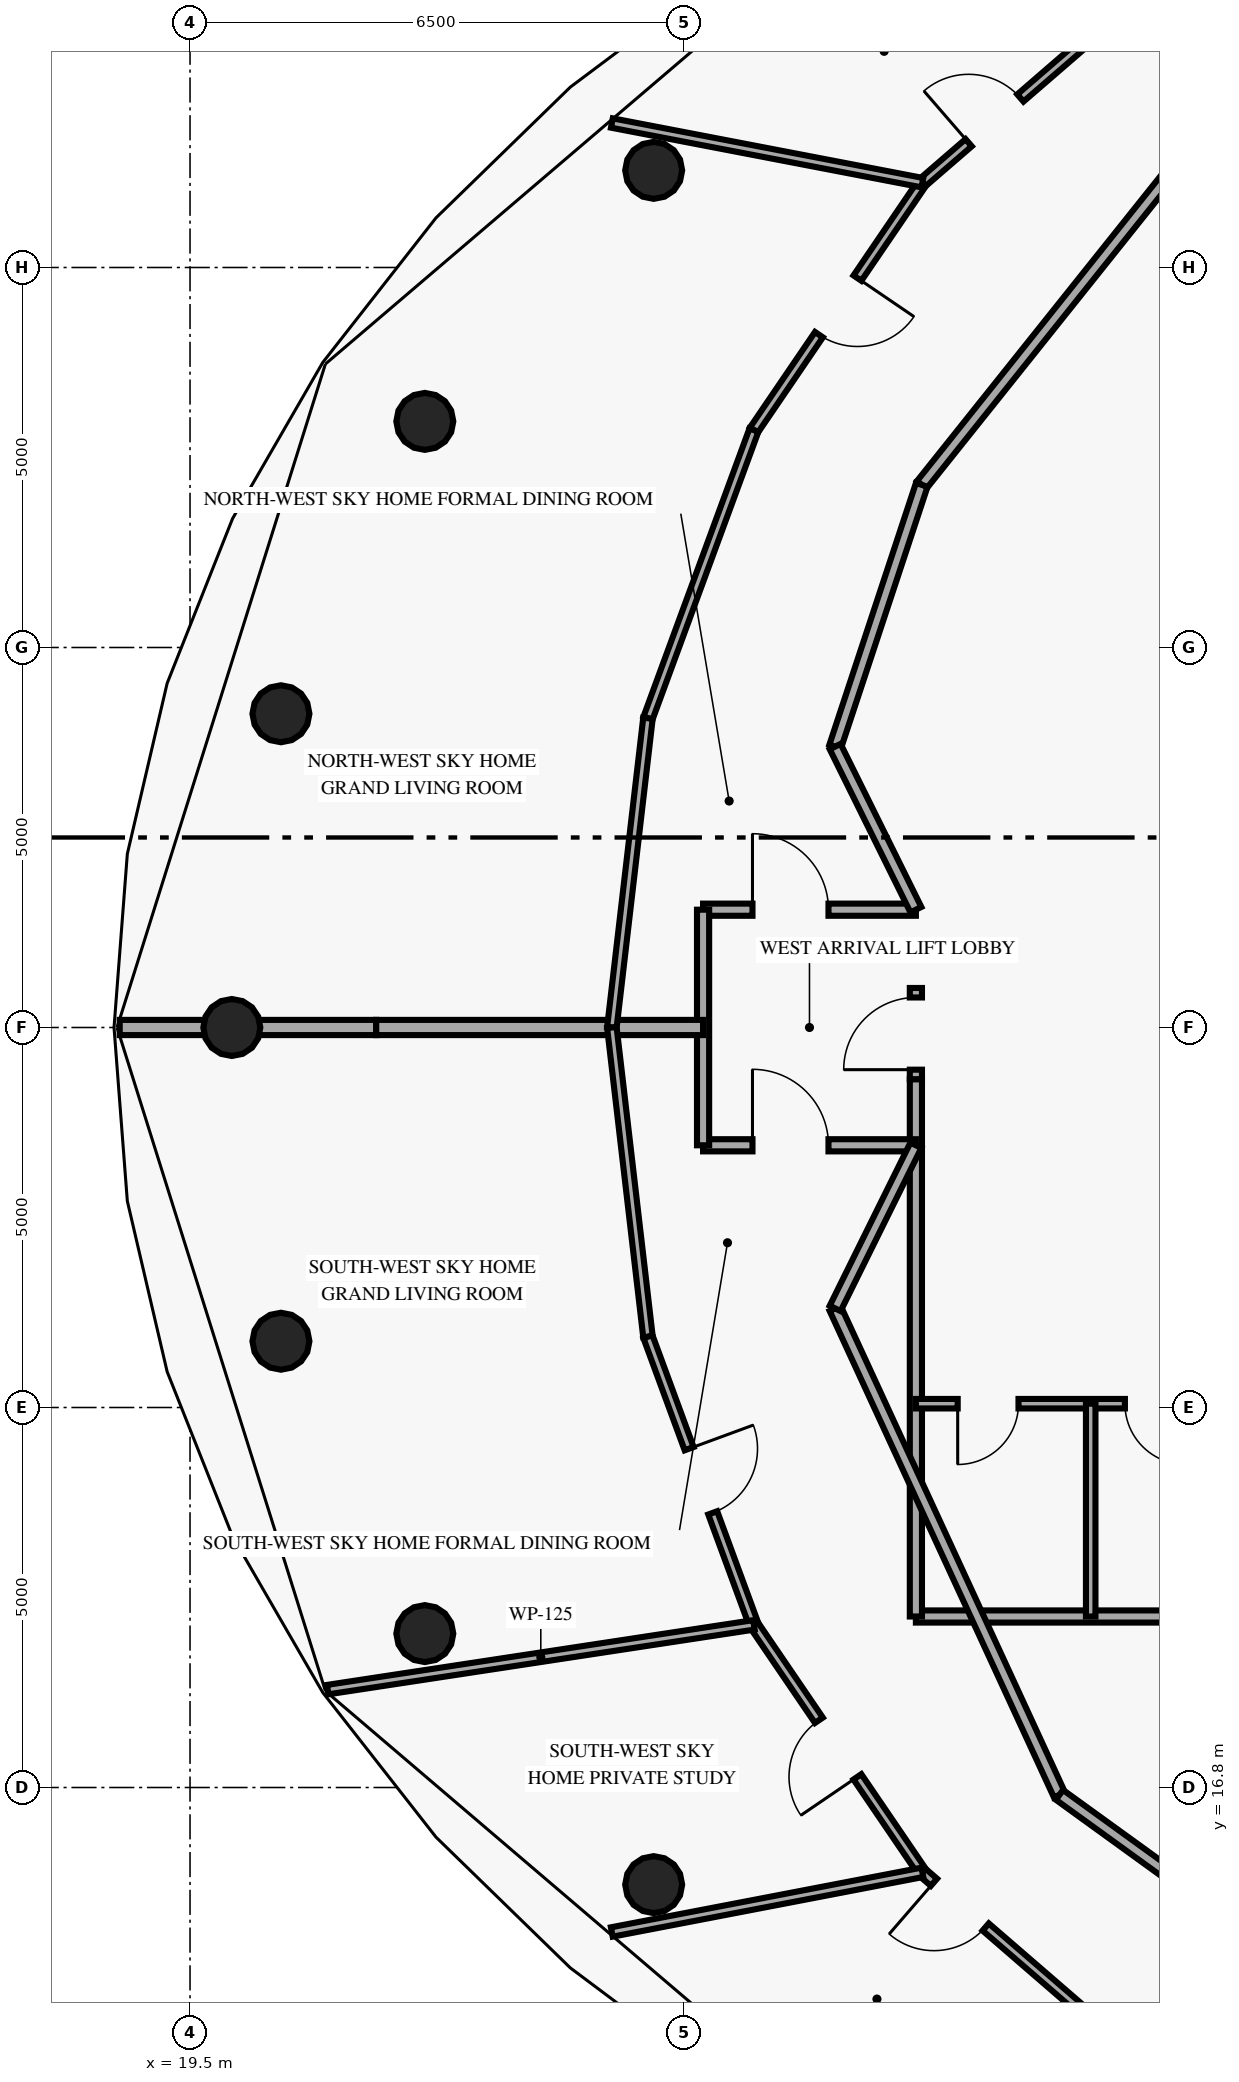
"""IFC4 building model, lengths in metres.
Left out: names, types, materials, properties, quantities, classifications, styles, units other than length and angle.
Written with IfcOpenShell. Run it as: python <this file> out.ifc"""

import sys

from ifc_helpers import new_model, si_unit, direction, frame, frame_2d, origin, origin_2d, place, context, subcontext, project, spatial, rectangle, circle, extrude, element, fill, save


model = new_model("IFC4")
c1 = context("Model", 3, precision=1e-05, world=origin(), true_north=direction((0.0, 1.0)))
c2 = subcontext(c1, "Body", "Model", "MODEL_VIEW")
j1 = project(units=[si_unit("LENGTHUNIT", "METRE"), si_unit("PLANEANGLEUNIT", "RADIAN")], contexts=[c1])
p1 = place(None, origin())
s1 = spatial("IfcSite", under=j1, at=p1, CompositionType="ELEMENT")
p2 = place(p1, origin())
s2 = spatial("IfcBuilding", under=s1, at=p2, CompositionType="ELEMENT")
p3 = place(p2, frame((0.0, 0.0, 297.4)))
s3 = spatial("IfcBuildingStorey", under=s2, at=p3, CompositionType="ELEMENT", Elevation=297.4)
for number, where, z_axis, x_axis in (
    (1, (25.6, 38.078, 0.0), (0.0, 0.0, 1.0), (1.0, 0.0, 0.0)),
    (2, (22.589, 34.775, 0.0), (0.0, 0.0, 1.0), (1.0, 0.0, 0.0)),
    (3, (20.696, 30.928, 0.0), (0.0, 0.0, 1.0), (1.0, 0.0, 0.0)),
    (4, (20.05, 26.8, 0.0), (0.0, 0.0, 1.0), (1.0, 0.0, 0.0)),
    (5, (20.696, 22.672, 0.0), (0.0, 0.0, 1.0), (1.0, 0.0, 0.0)),
    (6, (22.589, 18.825, 0.0), (0.0, 0.0, 1.0), (1.0, 0.0, 0.0)),
    (7, (25.6, 15.522, 0.0), (0.0, 0.0, 1.0), (1.0, 0.0, 0.0)),
):
    element("IfcColumn", number, at=place(p3, frame(where, z_axis=z_axis, x_axis=x_axis)), inside=s3, PredefinedType="COLUMN", context=c2, shape_type="SweptSolid", body=[
        extrude(circle(Radius=0.375, at=origin_2d()), origin(), (0.0, 0.0, 1.0), 3.45),
    ])
p4 = place(p3, frame((29.05, 19.05, 0.0), z_axis=(0.0, 0.0, 1.0), x_axis=(1.0, 0.0, 0.0)))
e8 = element("IfcWall", 8, at=p4, inside=s3, PredefinedType="PARTITIONING", context=c2, shape_type="SweptSolid", body=[
    extrude(rectangle(XDim=4.65, YDim=0.16, at=frame_2d((2.325, 0.0))), origin(), (0.0, 0.0, 1.0), 3.45),
])
p5 = place(p3, frame((29.05, 19.05, 0.0), z_axis=(0.0, 0.0, 1.0), x_axis=(0.0, 1.0, 0.0)))
e9 = element("IfcWall", 9, at=p5, inside=s3, PredefinedType="PARTITIONING", context=c2, shape_type="SweptSolid", body=[
    extrude(rectangle(XDim=7.07, YDim=0.16, at=frame_2d((3.535, 0.0))), origin(), (0.0, 0.0, 1.0), 3.45),
])
p6 = place(p3, frame((33.6, 21.85, 0.0), z_axis=(0.0, 0.0, 1.0), x_axis=(-1.0, 0.0, 0.0)))
e10 = element("IfcWall", 10, at=p6, inside=s3, PredefinedType="PARTITIONING", context=c2, shape_type="SweptSolid", body=[
    extrude(rectangle(XDim=4.55, YDim=0.125, at=frame_2d((2.275, 0.0))), origin(), (0.0, 0.0, 1.0), 3.45),
])
p7 = place(p6, frame((3.2, 0.0, 0.0)))
e11 = element("IfcOpeningElement", 11, at=p7, cuts=e10, PredefinedType="OPENING", context=c2, shape_type="SweptSolid", body=[
    extrude(rectangle(XDim=0.8, YDim=2.05, at=frame_2d((0.4, 1.025))), frame((0.0, 0.073, 0.0), z_axis=(0.0, -1.0, 0.0), x_axis=(1.0, 0.0, 0.0)), (0.0, 0.0, 1.0), 0.145),
])
p8 = place(p6, frame((1.0, 0.0, 0.0)))
e12 = element("IfcOpeningElement", 12, at=p8, cuts=e10, PredefinedType="OPENING", context=c2, shape_type="SweptSolid", body=[
    extrude(rectangle(XDim=0.8, YDim=2.05, at=frame_2d((0.4, 1.025))), frame((0.0, 0.073, 0.0), z_axis=(0.0, -1.0, 0.0), x_axis=(1.0, 0.0, 0.0)), (0.0, 0.0, 1.0), 0.145),
])
p9 = place(p3, frame((31.35, 19.05, 0.0), z_axis=(0.0, 0.0, 1.0), x_axis=(0.0, 1.0, 0.0)))
e13 = element("IfcWall", 13, at=p9, inside=s3, PredefinedType="PARTITIONING", context=c2, shape_type="SweptSolid", body=[
    extrude(rectangle(XDim=2.8, YDim=0.125, at=frame_2d((1.4, 0.0))), origin(), (0.0, 0.0, 1.0), 3.45),
])
p10 = place(p3, frame((29.05, 26.12, 0.0), z_axis=(0.0, 0.0, 1.0), x_axis=(0.0, 1.0, 0.0)))
e14 = element("IfcWall", 14, at=p10, inside=s3, PredefinedType="PARTITIONING", context=c2, shape_type="SweptSolid", body=[
    extrude(rectangle(XDim=1.2, YDim=0.16, at=frame_2d((0.6, 0.0))), origin(), (0.0, 0.0, 1.0), 3.45),
])
p11 = place(p10, frame((0.125, 0.0, 0.0)))
e15 = element("IfcOpeningElement", 15, at=p11, cuts=e14, PredefinedType="OPENING", context=c2, shape_type="SweptSolid", body=[
    extrude(rectangle(XDim=0.95, YDim=2.15, at=frame_2d((0.475, 1.075))), frame((0.0, 0.09, 0.0), z_axis=(0.0, -1.0, 0.0), x_axis=(1.0, 0.0, 0.0)), (0.0, 0.0, 1.0), 0.18),
])
p12 = place(p3, frame((33.3, 39.167, 0.0), z_axis=(0.0, 0.0, 1.0), x_axis=(-0.623915746766, -0.781491612839, 0.0)))
e16 = element("IfcWall", 16, at=p12, inside=s3, PredefinedType="PARTITIONING", context=c2, shape_type="SweptSolid", body=[
    extrude(rectangle(XDim=6.688, YDim=0.16, at=frame_2d((3.344, 0.0))), origin(), (0.0, 0.0, 1.0), 3.45),
])
p13 = place(p3, frame((29.127, 33.94, 0.0), z_axis=(0.0, 0.0, 1.0), x_axis=(-0.313985571683, -0.949427754374, 0.0)))
e17 = element("IfcWall", 17, at=p13, inside=s3, PredefinedType="PARTITIONING", context=c2, shape_type="SweptSolid", body=[
    extrude(rectangle(XDim=3.627, YDim=0.16, at=frame_2d((1.813, 0.0))), origin(), (0.0, 0.0, 1.0), 3.45),
])
p14 = place(p3, frame((27.988, 23.104, 0.0), z_axis=(0.0, 0.0, 1.0), x_axis=(0.418656179426, -0.908144814128, 0.0)))
e18 = element("IfcWall", 18, at=p14, inside=s3, PredefinedType="PARTITIONING", context=c2, shape_type="SweptSolid", body=[
    extrude(rectangle(XDim=7.049, YDim=0.16, at=frame_2d((3.524, 0.0))), origin(), (0.0, 0.0, 1.0), 3.45),
])
p15 = place(p3, frame((30.939, 16.703, 0.0), z_axis=(0.0, 0.0, 1.0), x_axis=(0.810290119061, -0.586028943784, 0.0)))
e19 = element("IfcWall", 19, at=p15, inside=s3, PredefinedType="PARTITIONING", context=c2, shape_type="SweptSolid", body=[
    extrude(rectangle(XDim=6.306, YDim=0.16, at=frame_2d((3.153, 0.0))), origin(), (0.0, 0.0, 1.0), 3.45),
])
p16 = place(p3, frame((26.25, 28.35, 0.0), z_axis=(0.0, 0.0, 1.0), x_axis=(1.0, 0.0, 0.0)))
e20 = element("IfcWall", 20, at=p16, inside=s3, PredefinedType="PARTITIONING", context=c2, shape_type="SweptSolid", body=[
    extrude(rectangle(XDim=2.8, YDim=0.16, at=frame_2d((1.4, 0.0))), origin(), (0.0, 0.0, 1.0), 2.515),
])
p17 = place(p16, frame((0.65, 0.0, 0.0)))
e21 = element("IfcOpeningElement", 21, at=p17, cuts=e20, PredefinedType="OPENING", context=c2, shape_type="SweptSolid", body=[
    extrude(rectangle(XDim=1.0, YDim=2.15, at=frame_2d((0.5, 1.075))), frame((0.0, 0.09, 0.0), z_axis=(0.0, -1.0, 0.0), x_axis=(1.0, 0.0, 0.0)), (0.0, 0.0, 1.0), 0.18),
])
p18 = place(p3, frame((26.25, 25.25, 0.0), z_axis=(0.0, 0.0, 1.0), x_axis=(1.0, 0.0, 0.0)))
e22 = element("IfcWall", 22, at=p18, inside=s3, PredefinedType="PARTITIONING", context=c2, shape_type="SweptSolid", body=[
    extrude(rectangle(XDim=2.8, YDim=0.16, at=frame_2d((1.4, 0.0))), origin(), (0.0, 0.0, 1.0), 3.45),
])
p19 = place(p18, frame((0.65, 0.0, 0.0)))
e23 = element("IfcOpeningElement", 23, at=p19, cuts=e22, PredefinedType="OPENING", context=c2, shape_type="SweptSolid", body=[
    extrude(rectangle(XDim=1.0, YDim=2.15, at=frame_2d((0.5, 1.075))), frame((0.0, 0.09, 0.0), z_axis=(0.0, -1.0, 0.0), x_axis=(1.0, 0.0, 0.0)), (0.0, 0.0, 1.0), 0.18),
])
p20 = place(p3, frame((26.25, 25.25, 0.0), z_axis=(0.0, 0.0, 1.0), x_axis=(0.0, 1.0, 0.0)))
e24 = element("IfcWall", 24, at=p20, inside=s3, PredefinedType="PARTITIONING", context=c2, shape_type="SweptSolid", body=[
    extrude(rectangle(XDim=3.1, YDim=0.16, at=frame_2d((1.55, 0.0))), origin(), (0.0, 0.0, 1.0), 3.45),
])
for number, where, z_axis, x_axis in (
    (25, (27.988, 30.496, 0.0), (0.0, 0.0, 1.0), (0.444, -0.896, 0.0)),
    (26, (27.988, 23.104, 0.0), (0.0, 0.0, 1.0), (0.444, 0.896, 0.0)),
):
    element("IfcWall", number, at=place(p3, frame(where, z_axis=z_axis, x_axis=x_axis)), inside=s3, PredefinedType="PARTITIONING", context=c2, shape_type="SweptSolid", body=[
        extrude(rectangle(XDim=2.394, YDim=0.16, at=frame_2d((1.197, 0.0))), origin(), (0.0, 0.0, 1.0), 3.45),
    ])
p21 = place(p3, frame((26.25, 26.8, 0.0), z_axis=(0.0, 0.0, 1.0), x_axis=(-1.0, 0.0, 0.0)))
e27 = element("IfcWall", 27, at=p21, inside=s3, PredefinedType="PARTITIONING", context=c2, shape_type="SweptSolid", body=[
    extrude(rectangle(XDim=1.2, YDim=0.2, at=frame_2d((0.6, 0.0))), origin(), (0.0, 0.0, 1.0), 3.45),
])
p22 = place(p3, frame((25.05, 26.8, 0.0), z_axis=(0.0, 0.0, 1.0), x_axis=(-1.0, 0.0, 0.0)))
e28 = element("IfcWall", 28, at=p22, inside=s3, PredefinedType="PARTITIONING", context=c2, shape_type="SweptSolid", body=[
    extrude(rectangle(XDim=3.102, YDim=0.2, at=frame_2d((1.551, 0.0))), origin(), (0.0, 0.0, 1.0), 3.45),
])
p23 = place(p3, frame((21.948, 26.8, 0.0), z_axis=(0.0, 0.0, 1.0), x_axis=(-1.0, 0.0, 0.0)))
e29 = element("IfcWall", 29, at=p23, inside=s3, PredefinedType="PARTITIONING", context=c2, shape_type="SweptSolid", body=[
    extrude(rectangle(XDim=1.914, YDim=0.2, at=frame_2d((0.957, 0.0))), origin(), (0.0, 0.0, 1.0), 2.515),
])
p24 = place(p3, frame((20.034, 26.8, 0.0), z_axis=(0.0, 0.0, 1.0), x_axis=(-1.0, 0.0, 0.0)))
e30 = element("IfcWall", 30, at=p24, inside=s3, PredefinedType="PARTITIONING", context=c2, shape_type="SweptSolid", body=[
    extrude(rectangle(XDim=1.459, YDim=0.2, at=frame_2d((0.729, 0.0))), origin(), (0.0, 0.0, 1.0), 3.45),
])
p25 = place(p3, frame((29.136, 37.916, 0.0), z_axis=(0.0, 0.0, 1.0), x_axis=(0.756424716633, 0.654080765706, 0.0)))
e31 = element("IfcWall", 31, at=p25, inside=s3, PredefinedType="PARTITIONING", context=c2, shape_type="SweptSolid", body=[
    extrude(rectangle(XDim=3.819, YDim=0.125, at=frame_2d((1.91, 0.0))), origin(), (0.0, 0.0, 1.0), 3.45),
])
p26 = place(p25, frame((0.804, 0.0, 0.0)))
e32 = element("IfcOpeningElement", 32, at=p26, cuts=e31, PredefinedType="OPENING", context=c2, shape_type="SweptSolid", body=[
    extrude(rectangle(XDim=0.9, YDim=2.1, at=frame_2d((0.45, 1.05))), frame((0.0, 0.073, 0.0), z_axis=(0.0, -1.0, 0.0), x_axis=(1.0, 0.0, 0.0)), (0.0, 0.0, 1.0), 0.145),
])
p27 = place(p3, frame((26.919, 34.66, 0.0), z_axis=(0.0, 0.0, 1.0), x_axis=(0.562811699753, 0.826585138157, 0.0)))
e33 = element("IfcWall", 33, at=p27, inside=s3, PredefinedType="PARTITIONING", context=c2, shape_type="SweptSolid", body=[
    extrude(rectangle(XDim=3.939, YDim=0.125, at=frame_2d((1.97, 0.0))), origin(), (0.0, 0.0, 1.0), 3.45),
])
p28 = place(p27, frame((1.52, 0.0, 0.0)))
e34 = element("IfcOpeningElement", 34, at=p28, cuts=e33, PredefinedType="OPENING", context=c2, shape_type="SweptSolid", body=[
    extrude(rectangle(XDim=0.9, YDim=2.1, at=frame_2d((0.45, 1.05))), frame((0.0, 0.073, 0.0), z_axis=(0.0, -1.0, 0.0), x_axis=(1.0, 0.0, 0.0)), (0.0, 0.0, 1.0), 0.145),
])
p29 = place(p3, frame((26.919, 34.66, 0.0), z_axis=(0.0, 0.0, 1.0), x_axis=(-0.345128286029, -0.938555521097, 0.0)))
e35 = element("IfcWall", 35, at=p29, inside=s3, PredefinedType="PARTITIONING", context=c2, shape_type="SweptSolid", body=[
    extrude(rectangle(XDim=4.039, YDim=0.125, at=frame_2d((2.02, 0.0))), origin(), (0.0, 0.0, 1.0), 3.45),
])
p30 = place(p3, frame((25.525, 30.869, 0.0), z_axis=(0.0, 0.0, 1.0), x_axis=(-0.115917937966, -0.993258793899, 0.0)))
e36 = element("IfcWall", 36, at=p30, inside=s3, PredefinedType="PARTITIONING", context=c2, shape_type="SweptSolid", body=[
    extrude(rectangle(XDim=4.096, YDim=0.125, at=frame_2d((2.048, 0.0))), origin(), (0.0, 0.0, 1.0), 3.45),
])
p31 = place(p3, frame((29.136, 37.916, 0.0), z_axis=(0.0, 0.0, 1.0), x_axis=(-0.982044095555, 0.188651515727, 0.0)))
e37 = element("IfcWall", 37, at=p31, inside=s3, PredefinedType="PARTITIONING", context=c2, shape_type="SweptSolid", body=[
    extrude(rectangle(XDim=4.161, YDim=0.125, at=frame_2d((2.08, 0.0))), origin(), (0.0, 0.0, 1.0), 3.45),
])
p32 = place(p3, frame((32.784, 13.928, 0.0), z_axis=(0.0, 0.0, 1.0), x_axis=(-0.715111418379, -0.699010485833, 0.0)))
e38 = element("IfcWall", 38, at=p32, inside=s3, PredefinedType="PARTITIONING", context=c2, shape_type="SweptSolid", body=[
    extrude(rectangle(XDim=1.062, YDim=0.125, at=frame_2d((0.531, 0.0))), origin(), (0.0, 0.0, 1.0), 3.45),
])
p33 = place(p3, frame((25.05, 26.8, 0.0), z_axis=(0.0, 0.0, 1.0), x_axis=(0.115911076473, -0.993259594643, 0.0)))
e39 = element("IfcWall", 39, at=p33, inside=s3, PredefinedType="PARTITIONING", context=c2, shape_type="SweptSolid", body=[
    extrude(rectangle(XDim=4.097, YDim=0.125, at=frame_2d((2.048, 0.0))), origin(), (0.0, 0.0, 1.0), 3.45),
])
p34 = place(p3, frame((26.919, 18.94, 0.0), z_axis=(0.0, 0.0, 1.0), x_axis=(-0.345128286029, 0.938555521097, 0.0)))
e40 = element("IfcWall", 40, at=p34, inside=s3, PredefinedType="PARTITIONING", context=c2, shape_type="SweptSolid", body=[
    extrude(rectangle(XDim=4.039, YDim=0.125, at=frame_2d((2.02, 0.0))), origin(), (0.0, 0.0, 1.0), 3.45),
])
p35 = place(p34, frame((1.57, 0.0, 0.0)))
e41 = element("IfcOpeningElement", 41, at=p35, cuts=e40, PredefinedType="OPENING", context=c2, shape_type="SweptSolid", body=[
    extrude(rectangle(XDim=0.9, YDim=2.1, at=frame_2d((0.45, 1.05))), frame((0.0, 0.073, 0.0), z_axis=(0.0, -1.0, 0.0), x_axis=(1.0, 0.0, 0.0)), (0.0, 0.0, 1.0), 0.145),
])
p36 = place(p3, frame((29.136, 15.684, 0.0), z_axis=(0.0, 0.0, 1.0), x_axis=(-0.562840533245, 0.826565505049, 0.0)))
e42 = element("IfcWall", 42, at=p36, inside=s3, PredefinedType="PARTITIONING", context=c2, shape_type="SweptSolid", body=[
    extrude(rectangle(XDim=3.939, YDim=0.125, at=frame_2d((1.969, 0.0))), origin(), (0.0, 0.0, 1.0), 3.45),
])
p37 = place(p36, frame((1.52, 0.0, 0.0)))
e43 = element("IfcOpeningElement", 43, at=p37, cuts=e42, PredefinedType="OPENING", context=c2, shape_type="SweptSolid", body=[
    extrude(rectangle(XDim=0.9, YDim=2.1, at=frame_2d((0.45, 1.05))), frame((0.0, 0.073, 0.0), z_axis=(0.0, -1.0, 0.0), x_axis=(1.0, 0.0, 0.0)), (0.0, 0.0, 1.0), 0.145),
])
p38 = place(p3, frame((32.025, 13.186, 0.0), z_axis=(0.0, 0.0, 1.0), x_axis=(-0.756424716633, 0.654080765706, 0.0)))
e44 = element("IfcWall", 44, at=p38, inside=s3, PredefinedType="PARTITIONING", context=c2, shape_type="SweptSolid", body=[
    extrude(rectangle(XDim=3.819, YDim=0.125, at=frame_2d((1.91, 0.0))), origin(), (0.0, 0.0, 1.0), 3.45),
])
p39 = place(p38, frame((2.719, 0.0, 0.0)))
e45 = element("IfcOpeningElement", 45, at=p39, cuts=e44, PredefinedType="OPENING", context=c2, shape_type="SweptSolid", body=[
    extrude(rectangle(XDim=0.9, YDim=2.1, at=frame_2d((0.45, 1.05))), frame((0.0, 0.073, 0.0), z_axis=(0.0, -1.0, 0.0), x_axis=(1.0, 0.0, 0.0)), (0.0, 0.0, 1.0), 0.145),
])
p40 = place(p3, frame((26.919, 18.94, 0.0), z_axis=(0.0, 0.0, 1.0), x_axis=(-0.988653601615, -0.150213368291, 0.0)))
e46 = element("IfcWall", 46, at=p40, inside=s3, PredefinedType="PARTITIONING", context=c2, shape_type="SweptSolid", body=[
    extrude(rectangle(XDim=5.672, YDim=0.125, at=frame_2d((2.836, 0.0))), origin(), (0.0, 0.0, 1.0), 3.45),
])
p41 = place(p3, frame((29.136, 15.684, 0.0), z_axis=(0.0, 0.0, 1.0), x_axis=(-0.982041578383, -0.188664618643, 0.0)))
e47 = element("IfcWall", 47, at=p41, inside=s3, PredefinedType="PARTITIONING", context=c2, shape_type="SweptSolid", body=[
    extrude(rectangle(XDim=4.162, YDim=0.125, at=frame_2d((2.081, 0.0))), origin(), (0.0, 0.0, 1.0), 3.45),
])
p42 = place(p7, origin())
e48 = element("IfcDoor", 48, at=p42, inside=s3, OperationType="SINGLE_SWING_RIGHT", PredefinedType="DOOR", context=c2, shape_type="SweptSolid", body=[
    extrude(rectangle(XDim=0.8, YDim=2.05, at=frame_2d((0.4, 1.025))), frame((0.0, 0.025, 0.0), z_axis=(0.0, -1.0, 0.0), x_axis=(1.0, 0.0, 0.0)), (0.0, 0.0, 1.0), 0.05),
])
fill(e11, e48)
p43 = place(p8, origin())
e49 = element("IfcDoor", 49, at=p43, inside=s3, OperationType="SINGLE_SWING_LEFT", PredefinedType="DOOR", context=c2, shape_type="SweptSolid", body=[
    extrude(rectangle(XDim=0.8, YDim=2.05, at=frame_2d((0.4, 1.025))), frame((0.0, 0.025, 0.0), z_axis=(0.0, -1.0, 0.0), x_axis=(1.0, 0.0, 0.0)), (0.0, 0.0, 1.0), 0.05),
])
fill(e12, e49)
p44 = place(p11, origin())
e50 = element("IfcDoor", 50, at=p44, inside=s3, OperationType="SINGLE_SWING_RIGHT", PredefinedType="DOOR", context=c2, shape_type="SweptSolid", body=[
    extrude(rectangle(XDim=0.95, YDim=2.15, at=frame_2d((0.475, 1.075))), frame((0.0, 0.025, 0.0), z_axis=(0.0, -1.0, 0.0), x_axis=(1.0, 0.0, 0.0)), (0.0, 0.0, 1.0), 0.05),
])
fill(e15, e50)
p45 = place(p17, origin())
e51 = element("IfcDoor", 51, at=p45, inside=s3, OperationType="SINGLE_SWING_LEFT", PredefinedType="DOOR", context=c2, shape_type="SweptSolid", body=[
    extrude(rectangle(XDim=1.0, YDim=2.15, at=frame_2d((0.5, 1.075))), frame((0.0, 0.025, 0.0), z_axis=(0.0, -1.0, 0.0), x_axis=(1.0, 0.0, 0.0)), (0.0, 0.0, 1.0), 0.05),
])
fill(e21, e51)
p46 = place(p19, origin())
e52 = element("IfcDoor", 52, at=p46, inside=s3, OperationType="SINGLE_SWING_LEFT", PredefinedType="DOOR", context=c2, shape_type="SweptSolid", body=[
    extrude(rectangle(XDim=1.0, YDim=2.15, at=frame_2d((0.5, 1.075))), frame((0.0, 0.025, 0.0), z_axis=(0.0, -1.0, 0.0), x_axis=(1.0, 0.0, 0.0)), (0.0, 0.0, 1.0), 0.05),
])
fill(e23, e52)
p47 = place(p26, origin())
e53 = element("IfcDoor", 53, at=p47, inside=s3, OperationType="SINGLE_SWING_LEFT", PredefinedType="DOOR", context=c2, shape_type="SweptSolid", body=[
    extrude(rectangle(XDim=0.9, YDim=2.1, at=frame_2d((0.45, 1.05))), frame((0.0, 0.025, 0.0), z_axis=(0.0, -1.0, 0.0), x_axis=(1.0, 0.0, 0.0)), (0.0, 0.0, 1.0), 0.05),
])
fill(e32, e53)
p48 = place(p28, origin())
e54 = element("IfcDoor", 54, at=p48, inside=s3, OperationType="SINGLE_SWING_RIGHT", PredefinedType="DOOR", context=c2, shape_type="SweptSolid", body=[
    extrude(rectangle(XDim=0.9, YDim=2.1, at=frame_2d((0.45, 1.05))), frame((0.0, 0.025, 0.0), z_axis=(0.0, -1.0, 0.0), x_axis=(1.0, 0.0, 0.0)), (0.0, 0.0, 1.0), 0.05),
])
fill(e34, e54)
p49 = place(p35, origin())
e55 = element("IfcDoor", 55, at=p49, inside=s3, OperationType="SINGLE_SWING_RIGHT", PredefinedType="DOOR", context=c2, shape_type="SweptSolid", body=[
    extrude(rectangle(XDim=0.9, YDim=2.1, at=frame_2d((0.45, 1.05))), frame((0.0, 0.025, 0.0), z_axis=(0.0, -1.0, 0.0), x_axis=(1.0, 0.0, 0.0)), (0.0, 0.0, 1.0), 0.05),
])
fill(e41, e55)
p50 = place(p37, origin())
e56 = element("IfcDoor", 56, at=p50, inside=s3, OperationType="SINGLE_SWING_LEFT", PredefinedType="DOOR", context=c2, shape_type="SweptSolid", body=[
    extrude(rectangle(XDim=0.9, YDim=2.1, at=frame_2d((0.45, 1.05))), frame((0.0, 0.025, 0.0), z_axis=(0.0, -1.0, 0.0), x_axis=(1.0, 0.0, 0.0)), (0.0, 0.0, 1.0), 0.05),
])
fill(e43, e56)
p51 = place(p39, origin())
e57 = element("IfcDoor", 57, at=p51, inside=s3, OperationType="SINGLE_SWING_RIGHT", PredefinedType="DOOR", context=c2, shape_type="SweptSolid", body=[
    extrude(rectangle(XDim=0.9, YDim=2.1, at=frame_2d((0.45, 1.05))), frame((0.0, 0.025, 0.0), z_axis=(0.0, -1.0, 0.0), x_axis=(1.0, 0.0, 0.0)), (0.0, 0.0, 1.0), 0.05),
])
fill(e45, e57)
save(model, sys.argv[1])
